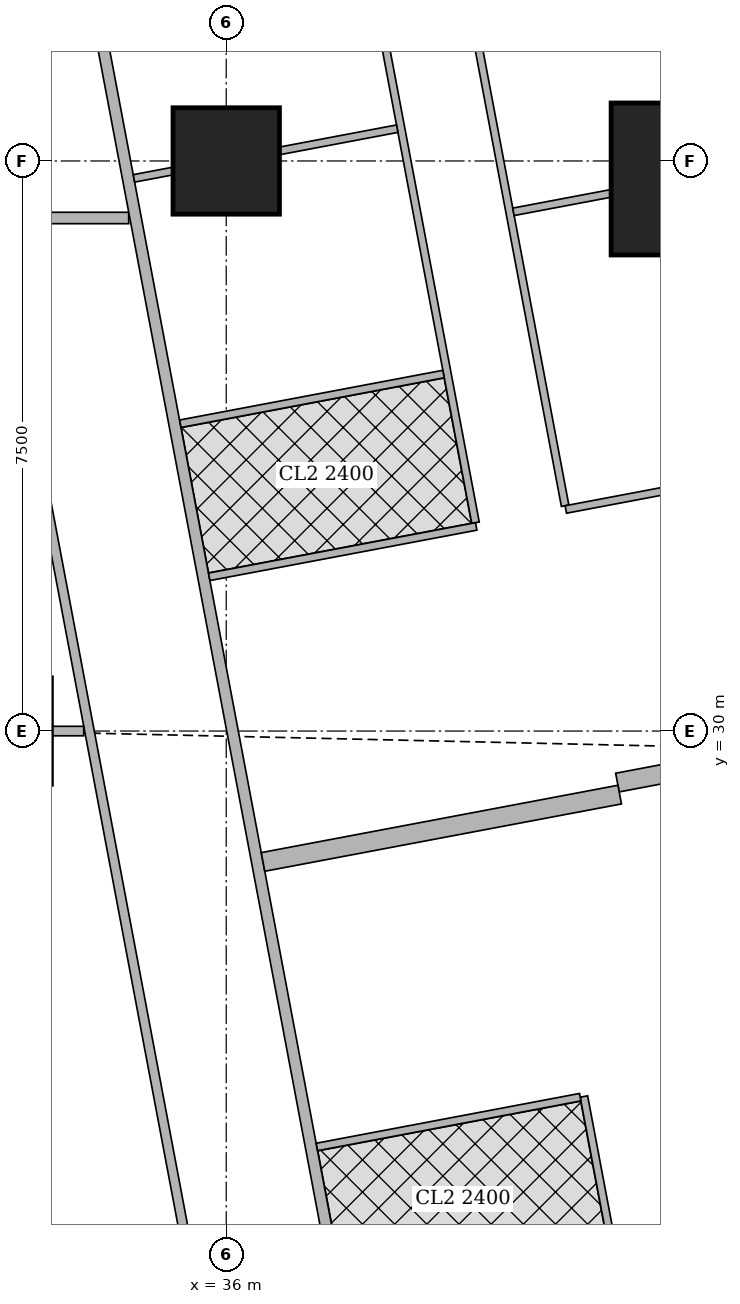
"""IFC4 building model, lengths in metres.
Left out: names, types, materials, properties, quantities, classifications, styles, units other than length and angle.
Written with IfcOpenShell. Run it as: python <this file> out.ifc"""

import sys

from ifc_helpers import new_model, si_unit, direction, frame, frame_2d, origin, origin_2d, place, context, subcontext, project, spatial, rectangle, extrude, element, fill, save


model = new_model("IFC4")
c1 = context("Model", 3, precision=1e-05, world=origin(), true_north=direction((0.0, 1.0)))
c2 = subcontext(c1, "Body", "Model", "MODEL_VIEW")
j1 = project(units=[si_unit("LENGTHUNIT", "METRE"), si_unit("PLANEANGLEUNIT", "RADIAN")], contexts=[c1])
p1 = place(None, origin())
s1 = spatial("IfcSite", under=j1, at=p1, CompositionType="ELEMENT")
p2 = place(p1, origin())
s2 = spatial("IfcBuilding", under=s1, at=p2, CompositionType="ELEMENT")
p3 = place(p2, frame((0.0, 0.0, 274.1)))
s3 = spatial("IfcBuildingStorey", under=s2, at=p3, CompositionType="ELEMENT", Elevation=274.1)
p4 = place(p3, frame((36.0, 37.5, 0.0), z_axis=(0.0, 0.0, 1.0), x_axis=(1.0, 0.0, 0.0)))
e1 = element("IfcColumn", 1, at=p4, inside=s3, PredefinedType="COLUMN", context=c2, shape_type="SweptSolid", body=[
    extrude(rectangle(XDim=1.4, YDim=1.4, at=origin_2d()), origin(), (0.0, 0.0, 1.0), 3.75),
])
p5 = place(p3, frame((42.064, 37.263, 0.0), z_axis=(0.0, 0.0, 1.0), x_axis=(1.0, 0.0, 0.0)))
e2 = element("IfcColumn", 2, at=p5, inside=s3, PredefinedType="COLUMN", context=c2, shape_type="SweptSolid", body=[
    extrude(rectangle(XDim=2.0, YDim=2.0, at=origin_2d()), origin(), (0.0, 0.0, 1.0), 3.75),
])
p6 = place(p3, frame((29.501, 36.75, 0.0), z_axis=(0.0, 0.0, 1.0), x_axis=(1.0, 0.0, 0.0)))
e3 = element("IfcWall", 3, at=p6, inside=s3, PredefinedType="SOLIDWALL", context=c2, shape_type="SweptSolid", body=[
    extrude(rectangle(XDim=5.216, YDim=0.15, at=frame_2d((2.608, 0.0))), origin(), (0.0, 0.0, 1.0), 3.5),
])
p7 = place(p6, frame((3.305, 0.0, 0.0)))
e4 = element("IfcOpeningElement", 4, at=p7, cuts=e3, PredefinedType="OPENING", context=c2, shape_type="SweptSolid", body=[
    extrude(rectangle(XDim=1.0, YDim=2.1, at=frame_2d((0.5, 1.05))), frame((0.0, 0.085, 0.0), z_axis=(0.0, -1.0, 0.0), x_axis=(1.0, 0.0, 0.0)), (0.0, 0.0, 1.0), 0.17),
])
p8 = place(p3, frame((33.781, 42.186, 0.0), z_axis=(0.0, 0.0, 1.0), x_axis=(0.185593518645, -0.9826266055, 0.0)))
e5 = element("IfcWall", 5, at=p8, inside=s3, PredefinedType="SOLIDWALL", context=c2, shape_type="SweptSolid", body=[
    extrude(rectangle(XDim=35.961, YDim=0.15, at=frame_2d((17.98, 0.0))), origin(), (0.0, 0.0, 1.0), 2.5),
])
p9 = place(p8, frame((11.76, 0.0, 0.0)))
e6 = element("IfcOpeningElement", 6, at=p9, cuts=e5, PredefinedType="OPENING", context=c2, shape_type="SweptSolid", body=[
    extrude(rectangle(XDim=1.0, YDim=2.1, at=frame_2d((0.5, 1.05))), frame((0.0, 0.085, 0.0), z_axis=(0.0, -1.0, 0.0), x_axis=(1.0, 0.0, 0.0)), (0.0, 0.0, 1.0), 0.17),
])
p10 = place(p8, frame((15.576, 0.0, 0.0)))
e7 = element("IfcOpeningElement", 7, at=p10, cuts=e5, PredefinedType="OPENING", context=c2, shape_type="SweptSolid", body=[
    extrude(rectangle(XDim=1.0, YDim=2.1, at=frame_2d((0.5, 1.05))), frame((0.0, 0.085, 0.0), z_axis=(0.0, -1.0, 0.0), x_axis=(1.0, 0.0, 0.0)), (0.0, 0.0, 1.0), 0.17),
])
p11 = place(p8, frame((30.502, 0.0, 0.0)))
e8 = element("IfcOpeningElement", 8, at=p11, cuts=e5, PredefinedType="OPENING", context=c2, shape_type="SweptSolid", body=[
    extrude(rectangle(XDim=1.0, YDim=2.1, at=frame_2d((0.5, 1.05))), frame((0.0, 0.085, 0.0), z_axis=(0.0, -1.0, 0.0), x_axis=(1.0, 0.0, 0.0)), (0.0, 0.0, 1.0), 0.17),
])
p12 = place(p3, frame((38.744, 42.045, 0.0), z_axis=(0.0, 0.0, 1.0), x_axis=(0.185588352162, -0.982627581305, 0.0)))
e9 = element("IfcWall", 9, at=p12, inside=s3, PredefinedType="PARTITIONING", context=c2, shape_type="SweptSolid", body=[
    extrude(rectangle(XDim=9.241, YDim=0.1, at=frame_2d((4.621, 0.0))), origin(), (0.0, 0.0, 1.0), 3.5),
])
p13 = place(p12, frame((8.191, 0.0, 0.0)))
e10 = element("IfcOpeningElement", 10, at=p13, cuts=e9, PredefinedType="OPENING", context=c2, shape_type="SweptSolid", body=[
    extrude(rectangle(XDim=0.9, YDim=2.1, at=frame_2d((0.45, 1.05))), frame((0.0, 0.06, 0.0), z_axis=(0.0, -1.0, 0.0), x_axis=(1.0, 0.0, 0.0)), (0.0, 0.0, 1.0), 0.12),
])
p14 = place(p12, frame((4.215, 0.0, 0.0)))
e11 = element("IfcOpeningElement", 11, at=p14, cuts=e9, PredefinedType="OPENING", context=c2, shape_type="SweptSolid", body=[
    extrude(rectangle(XDim=0.9, YDim=2.1, at=frame_2d((0.45, 1.05))), frame((0.0, 0.06, 0.0), z_axis=(0.0, -1.0, 0.0), x_axis=(1.0, 0.0, 0.0)), (0.0, 0.0, 1.0), 0.12),
])
p15 = place(p3, frame((37.51, 42.109, 0.0), z_axis=(0.0, 0.0, 1.0), x_axis=(0.185659798122, -0.982614084654, 0.0)))
e12 = element("IfcWall", 12, at=p15, inside=s3, PredefinedType="PARTITIONING", context=c2, shape_type="SweptSolid", body=[
    extrude(rectangle(XDim=9.534, YDim=0.1, at=frame_2d((4.767, 0.0))), origin(), (0.0, 0.0, 1.0), 3.5),
])
p16 = place(p15, frame((8.109, 0.0, 0.0)))
e13 = element("IfcOpeningElement", 13, at=p16, cuts=e12, PredefinedType="OPENING", context=c2, shape_type="SweptSolid", body=[
    extrude(rectangle(XDim=0.9, YDim=2.1, at=frame_2d((0.45, 1.05))), frame((0.0, 0.06, 0.0), z_axis=(0.0, -1.0, 0.0), x_axis=(1.0, 0.0, 0.0)), (0.0, 0.0, 1.0), 0.12),
])
p17 = place(p15, frame((2.65, 0.0, 0.0)))
e14 = element("IfcOpeningElement", 14, at=p17, cuts=e12, PredefinedType="OPENING", context=c2, shape_type="SweptSolid", body=[
    extrude(rectangle(XDim=0.9, YDim=2.1, at=frame_2d((0.45, 1.05))), frame((0.0, 0.06, 0.0), z_axis=(0.0, -1.0, 0.0), x_axis=(1.0, 0.0, 0.0)), (0.0, 0.0, 1.0), 0.12),
])
p18 = place(p15, frame((5.44, 0.0, 0.0)))
e15 = element("IfcOpeningElement", 15, at=p18, cuts=e12, PredefinedType="OPENING", context=c2, shape_type="SweptSolid", body=[
    extrude(rectangle(XDim=0.9, YDim=2.1, at=frame_2d((0.45, 1.05))), frame((0.0, 0.06, 0.0), z_axis=(0.0, -1.0, 0.0), x_axis=(1.0, 0.0, 0.0)), (0.0, 0.0, 1.0), 0.12),
])
p19 = place(p3, frame((41.054, 37.072, 0.0), z_axis=(0.0, 0.0, 1.0), x_axis=(-0.982602741717, -0.185719821156, 0.0)))
e16 = element("IfcWall", 16, at=p19, inside=s3, PredefinedType="PARTITIONING", context=c2, shape_type="SweptSolid", body=[
    extrude(rectangle(XDim=1.297, YDim=0.1, at=frame_2d((0.649, 0.0))), origin(), (0.0, 0.0, 1.0), 3.5),
])
p20 = place(p3, frame((44.693, 33.713, 0.0), z_axis=(0.0, 0.0, 1.0), x_axis=(-0.982633535512, -0.185556823879, 0.0)))
e17 = element("IfcWall", 17, at=p20, inside=s3, PredefinedType="PARTITIONING", context=c2, shape_type="SweptSolid", body=[
    extrude(rectangle(XDim=4.3, YDim=0.1, at=frame_2d((2.15, 0.0))), origin(), (0.0, 0.0, 1.0), 2.5),
])
p21 = place(p3, frame((38.25, 37.925, 0.0), z_axis=(0.0, 0.0, 1.0), x_axis=(-0.982610209589, -0.185680305934, 0.0)))
e18 = element("IfcWall", 18, at=p21, inside=s3, PredefinedType="PARTITIONING", context=c2, shape_type="SweptSolid", body=[
    extrude(rectangle(XDim=1.567, YDim=0.1, at=frame_2d((0.784, 0.0))), origin(), (0.0, 0.0, 1.0), 3.5),
])
p22 = place(p3, frame((35.29, 37.366, 0.0), z_axis=(0.0, 0.0, 1.0), x_axis=(-0.982715597703, -0.185121727606, 0.0)))
e19 = element("IfcWall", 19, at=p22, inside=s3, PredefinedType="PARTITIONING", context=c2, shape_type="SweptSolid", body=[
    extrude(rectangle(XDim=0.513, YDim=0.1, at=frame_2d((0.256, 0.0))), origin(), (0.0, 0.0, 1.0), 3.5),
])
p23 = place(p3, frame((39.289, 32.692, 0.0), z_axis=(0.0, 0.0, 1.0), x_axis=(-0.982662827464, -0.185401638399, 0.0)))
e20 = element("IfcWall", 20, at=p23, inside=s3, PredefinedType="PARTITIONING", context=c2, shape_type="SweptSolid", body=[
    extrude(rectangle(XDim=3.575, YDim=0.1, at=frame_2d((1.788, 0.0))), origin(), (0.0, 0.0, 1.0), 3.5),
])
p24 = place(p3, frame((38.859, 34.697, 0.0), z_axis=(0.0, 0.0, 1.0), x_axis=(-0.982626628545, -0.185593396635, 0.0)))
e21 = element("IfcWall", 21, at=p24, inside=s3, PredefinedType="PARTITIONING", context=c2, shape_type="SweptSolid", body=[
    extrude(rectangle(XDim=3.524, YDim=0.1, at=frame_2d((1.762, 0.0))), origin(), (0.0, 0.0, 1.0), 3.5),
])
p25 = place(p3, frame((40.706, 25.192, 0.0), z_axis=(0.0, 0.0, 1.0), x_axis=(0.185629824463, -0.982619747547, 0.0)))
e22 = element("IfcWall", 22, at=p25, inside=s3, PredefinedType="PARTITIONING", context=c2, shape_type="SweptSolid", body=[
    extrude(rectangle(XDim=9.659, YDim=0.1, at=frame_2d((4.83, 0.0))), origin(), (0.0, 0.0, 1.0), 2.5),
])
p26 = place(p25, frame((0.575, 0.0, 0.0)))
e23 = element("IfcOpeningElement", 23, at=p26, cuts=e22, PredefinedType="OPENING", context=c2, shape_type="SweptSolid", body=[
    extrude(rectangle(XDim=0.9, YDim=2.1, at=frame_2d((0.45, 1.05))), frame((0.0, 0.06, 0.0), z_axis=(0.0, -1.0, 0.0), x_axis=(1.0, 0.0, 0.0)), (0.0, 0.0, 1.0), 0.12),
])
p27 = place(p25, frame((4.166, 0.0, 0.0)))
e24 = element("IfcOpeningElement", 24, at=p27, cuts=e22, PredefinedType="OPENING", context=c2, shape_type="SweptSolid", body=[
    extrude(rectangle(XDim=0.9, YDim=2.1, at=frame_2d((0.45, 1.05))), frame((0.0, 0.06, 0.0), z_axis=(0.0, -1.0, 0.0), x_axis=(1.0, 0.0, 0.0)), (0.0, 0.0, 1.0), 0.12),
])
p28 = place(p25, frame((2.483, 0.0, 0.0)))
e25 = element("IfcOpeningElement", 25, at=p28, cuts=e22, PredefinedType="OPENING", context=c2, shape_type="SweptSolid", body=[
    extrude(rectangle(XDim=0.9, YDim=2.1, at=frame_2d((0.45, 1.05))), frame((0.0, 0.06, 0.0), z_axis=(0.0, -1.0, 0.0), x_axis=(1.0, 0.0, 0.0)), (0.0, 0.0, 1.0), 0.12),
])
p29 = place(p25, frame((6.074, 0.0, 0.0)))
e26 = element("IfcOpeningElement", 26, at=p29, cuts=e22, PredefinedType="OPENING", context=c2, shape_type="SweptSolid", body=[
    extrude(rectangle(XDim=0.9, YDim=2.1, at=frame_2d((0.45, 1.05))), frame((0.0, 0.06, 0.0), z_axis=(0.0, -1.0, 0.0), x_axis=(1.0, 0.0, 0.0)), (0.0, 0.0, 1.0), 0.12),
])
p30 = place(p3, frame((40.657, 25.183, 0.0), z_axis=(0.0, 0.0, 1.0), x_axis=(-0.982585626838, -0.185810349366, 0.0)))
e27 = element("IfcWall", 27, at=p30, inside=s3, PredefinedType="PARTITIONING", context=c2, shape_type="SweptSolid", body=[
    extrude(rectangle(XDim=3.525, YDim=0.1, at=frame_2d((1.763, 0.0))), origin(), (0.0, 0.0, 1.0), 3.5),
])
p31 = place(p3, frame((42.456, 29.57, 0.0), z_axis=(0.0, 0.0, 1.0), x_axis=(-0.982517742323, -0.18616897169, 0.0)))
e28 = element("IfcWall", 28, at=p31, inside=s3, PredefinedType="SOLIDWALL", context=c2, shape_type="SweptSolid", body=[
    extrude(rectangle(XDim=1.332, YDim=0.25, at=frame_2d((0.666, 0.0))), origin(), (0.0, 0.0, 1.0), 2.5),
])
p32 = place(p3, frame((41.177, 29.164, 0.0), z_axis=(0.0, 0.0, 1.0), x_axis=(-0.982642846239, -0.185507511263, 0.0)))
e29 = element("IfcWall", 29, at=p32, inside=s3, PredefinedType="SOLIDWALL", context=c2, shape_type="SweptSolid", body=[
    extrude(rectangle(XDim=4.776, YDim=0.25, at=frame_2d((2.388, 0.0))), origin(), (0.0, 0.0, 1.0), 2.5),
])
p33 = place(p3, frame((37.947, 10.163, 0.0), z_axis=(0.0, 0.0, 1.0), x_axis=(-0.185572770922, 0.982630523998, 0.0)))
e30 = element("IfcWall", 30, at=p33, inside=s3, PredefinedType="PARTITIONING", context=c2, shape_type="SweptSolid", body=[
    extrude(rectangle(XDim=25.111, YDim=0.125, at=frame_2d((12.556, 0.0))), origin(), (0.0, 0.0, 1.0), 2.5),
])
p34 = place(p33, frame((0.708, 0.0, 0.0)))
e31 = element("IfcOpeningElement", 31, at=p34, cuts=e30, PredefinedType="OPENING", context=c2, shape_type="SweptSolid", body=[
    extrude(rectangle(XDim=1.0, YDim=2.1, at=frame_2d((0.5, 1.05))), frame((0.0, 0.073, 0.0), z_axis=(0.0, -1.0, 0.0), x_axis=(1.0, 0.0, 0.0)), (0.0, 0.0, 1.0), 0.145),
])
p35 = place(p33, frame((5.9, 0.0, 0.0)))
e32 = element("IfcOpeningElement", 32, at=p35, cuts=e30, PredefinedType="OPENING", context=c2, shape_type="SweptSolid", body=[
    extrude(rectangle(XDim=1.0, YDim=2.1, at=frame_2d((0.5, 1.05))), frame((0.0, 0.073, 0.0), z_axis=(0.0, -1.0, 0.0), x_axis=(1.0, 0.0, 0.0)), (0.0, 0.0, 1.0), 0.145),
])
p36 = place(p33, frame((13.378, 0.0, 0.0)))
e33 = element("IfcOpeningElement", 33, at=p36, cuts=e30, PredefinedType="OPENING", context=c2, shape_type="SweptSolid", body=[
    extrude(rectangle(XDim=1.0, YDim=2.1, at=frame_2d((0.5, 1.05))), frame((0.0, 0.073, 0.0), z_axis=(0.0, -1.0, 0.0), x_axis=(1.0, 0.0, 0.0)), (0.0, 0.0, 1.0), 0.145),
])
p37 = place(p33, frame((21.15, 0.0, 0.0)))
e34 = element("IfcOpeningElement", 34, at=p37, cuts=e30, PredefinedType="OPENING", context=c2, shape_type="SweptSolid", body=[
    extrude(rectangle(XDim=1.0, YDim=2.1, at=frame_2d((0.5, 1.05))), frame((0.0, 0.073, 0.0), z_axis=(0.0, -1.0, 0.0), x_axis=(1.0, 0.0, 0.0)), (0.0, 0.0, 1.0), 0.145),
])
p38 = place(p3, frame((33.701, 30.0, 0.0), z_axis=(0.0, 0.0, 1.0), x_axis=(1.0, 0.0, 0.0)))
e35 = element("IfcWall", 35, at=p38, inside=s3, PredefinedType="PARTITIONING", context=c2, shape_type="SweptSolid", body=[
    extrude(rectangle(XDim=0.424, YDim=0.125, at=frame_2d((0.212, 0.0))), origin(), (0.0, 0.0, 1.0), 2.5),
])
p39 = place(p13, origin())
e36 = element("IfcDoor", 36, at=p39, inside=s3, OperationType="SINGLE_SWING_RIGHT", PredefinedType="DOOR", context=c2, shape_type="SweptSolid", body=[
    extrude(rectangle(XDim=0.9, YDim=2.1, at=frame_2d((0.45, 1.05))), frame((0.0, 0.025, 0.0), z_axis=(0.0, -1.0, 0.0), x_axis=(1.0, 0.0, 0.0)), (0.0, 0.0, 1.0), 0.05),
])
fill(e10, e36)
p40 = place(p14, origin())
e37 = element("IfcDoor", 37, at=p40, inside=s3, OperationType="SINGLE_SWING_RIGHT", PredefinedType="DOOR", context=c2, shape_type="SweptSolid", body=[
    extrude(rectangle(XDim=0.9, YDim=2.1, at=frame_2d((0.45, 1.05))), frame((0.0, 0.025, 0.0), z_axis=(0.0, -1.0, 0.0), x_axis=(1.0, 0.0, 0.0)), (0.0, 0.0, 1.0), 0.05),
])
fill(e11, e37)
p41 = place(p16, origin())
e38 = element("IfcDoor", 38, at=p41, inside=s3, OperationType="SINGLE_SWING_LEFT", PredefinedType="DOOR", context=c2, shape_type="SweptSolid", body=[
    extrude(rectangle(XDim=0.9, YDim=2.1, at=frame_2d((0.45, 1.05))), frame((0.0, 0.025, 0.0), z_axis=(0.0, -1.0, 0.0), x_axis=(1.0, 0.0, 0.0)), (0.0, 0.0, 1.0), 0.05),
])
fill(e13, e38)
p42 = place(p17, origin())
e39 = element("IfcDoor", 39, at=p42, inside=s3, OperationType="SINGLE_SWING_RIGHT", PredefinedType="DOOR", context=c2, shape_type="SweptSolid", body=[
    extrude(rectangle(XDim=0.9, YDim=2.1, at=frame_2d((0.45, 1.05))), frame((0.0, 0.025, 0.0), z_axis=(0.0, -1.0, 0.0), x_axis=(1.0, 0.0, 0.0)), (0.0, 0.0, 1.0), 0.05),
])
fill(e14, e39)
p43 = place(p18, origin())
e40 = element("IfcDoor", 40, at=p43, inside=s3, OperationType="SINGLE_SWING_RIGHT", PredefinedType="DOOR", context=c2, shape_type="SweptSolid", body=[
    extrude(rectangle(XDim=0.9, YDim=2.1, at=frame_2d((0.45, 1.05))), frame((0.0, 0.025, 0.0), z_axis=(0.0, -1.0, 0.0), x_axis=(1.0, 0.0, 0.0)), (0.0, 0.0, 1.0), 0.05),
])
fill(e15, e40)
p44 = place(p9, origin())
e41 = element("IfcDoor", 41, at=p44, inside=s3, OperationType="SINGLE_SWING_LEFT", PredefinedType="DOOR", context=c2, shape_type="SweptSolid", body=[
    extrude(rectangle(XDim=1.0, YDim=2.1, at=frame_2d((0.5, 1.05))), frame((0.0, 0.025, 0.0), z_axis=(0.0, -1.0, 0.0), x_axis=(1.0, 0.0, 0.0)), (0.0, 0.0, 1.0), 0.05),
])
fill(e6, e41)
p45 = place(p26, origin())
e42 = element("IfcDoor", 42, at=p45, inside=s3, OperationType="SINGLE_SWING_RIGHT", PredefinedType="DOOR", context=c2, shape_type="SweptSolid", body=[
    extrude(rectangle(XDim=0.9, YDim=2.1, at=frame_2d((0.45, 1.05))), frame((0.0, 0.025, 0.0), z_axis=(0.0, -1.0, 0.0), x_axis=(1.0, 0.0, 0.0)), (0.0, 0.0, 1.0), 0.05),
])
fill(e23, e42)
p46 = place(p10, origin())
e43 = element("IfcDoor", 43, at=p46, inside=s3, OperationType="SINGLE_SWING_RIGHT", PredefinedType="DOOR", context=c2, shape_type="SweptSolid", body=[
    extrude(rectangle(XDim=1.0, YDim=2.1, at=frame_2d((0.5, 1.05))), frame((0.0, 0.025, 0.0), z_axis=(0.0, -1.0, 0.0), x_axis=(1.0, 0.0, 0.0)), (0.0, 0.0, 1.0), 0.05),
])
fill(e7, e43)
p47 = place(p7, origin())
e44 = element("IfcDoor", 44, at=p47, inside=s3, OperationType="SINGLE_SWING_RIGHT", PredefinedType="DOOR", context=c2, shape_type="SweptSolid", body=[
    extrude(rectangle(XDim=1.0, YDim=2.1, at=frame_2d((0.5, 1.05))), frame((0.0, 0.025, 0.0), z_axis=(0.0, -1.0, 0.0), x_axis=(1.0, 0.0, 0.0)), (0.0, 0.0, 1.0), 0.05),
])
fill(e4, e44)
p48 = place(p36, origin())
e45 = element("IfcDoor", 45, at=p48, inside=s3, OperationType="SINGLE_SWING_LEFT", PredefinedType="DOOR", context=c2, shape_type="SweptSolid", body=[
    extrude(rectangle(XDim=1.0, YDim=2.1, at=frame_2d((0.5, 1.05))), frame((0.0, 0.025, 0.0), z_axis=(0.0, -1.0, 0.0), x_axis=(1.0, 0.0, 0.0)), (0.0, 0.0, 1.0), 0.05),
])
fill(e33, e45)
p49 = place(p37, origin())
e46 = element("IfcDoor", 46, at=p49, inside=s3, OperationType="SINGLE_SWING_LEFT", PredefinedType="DOOR", context=c2, shape_type="SweptSolid", body=[
    extrude(rectangle(XDim=1.0, YDim=2.1, at=frame_2d((0.5, 1.05))), frame((0.0, 0.025, 0.0), z_axis=(0.0, -1.0, 0.0), x_axis=(1.0, 0.0, 0.0)), (0.0, 0.0, 1.0), 0.05),
])
fill(e34, e46)
save(model, sys.argv[1])
